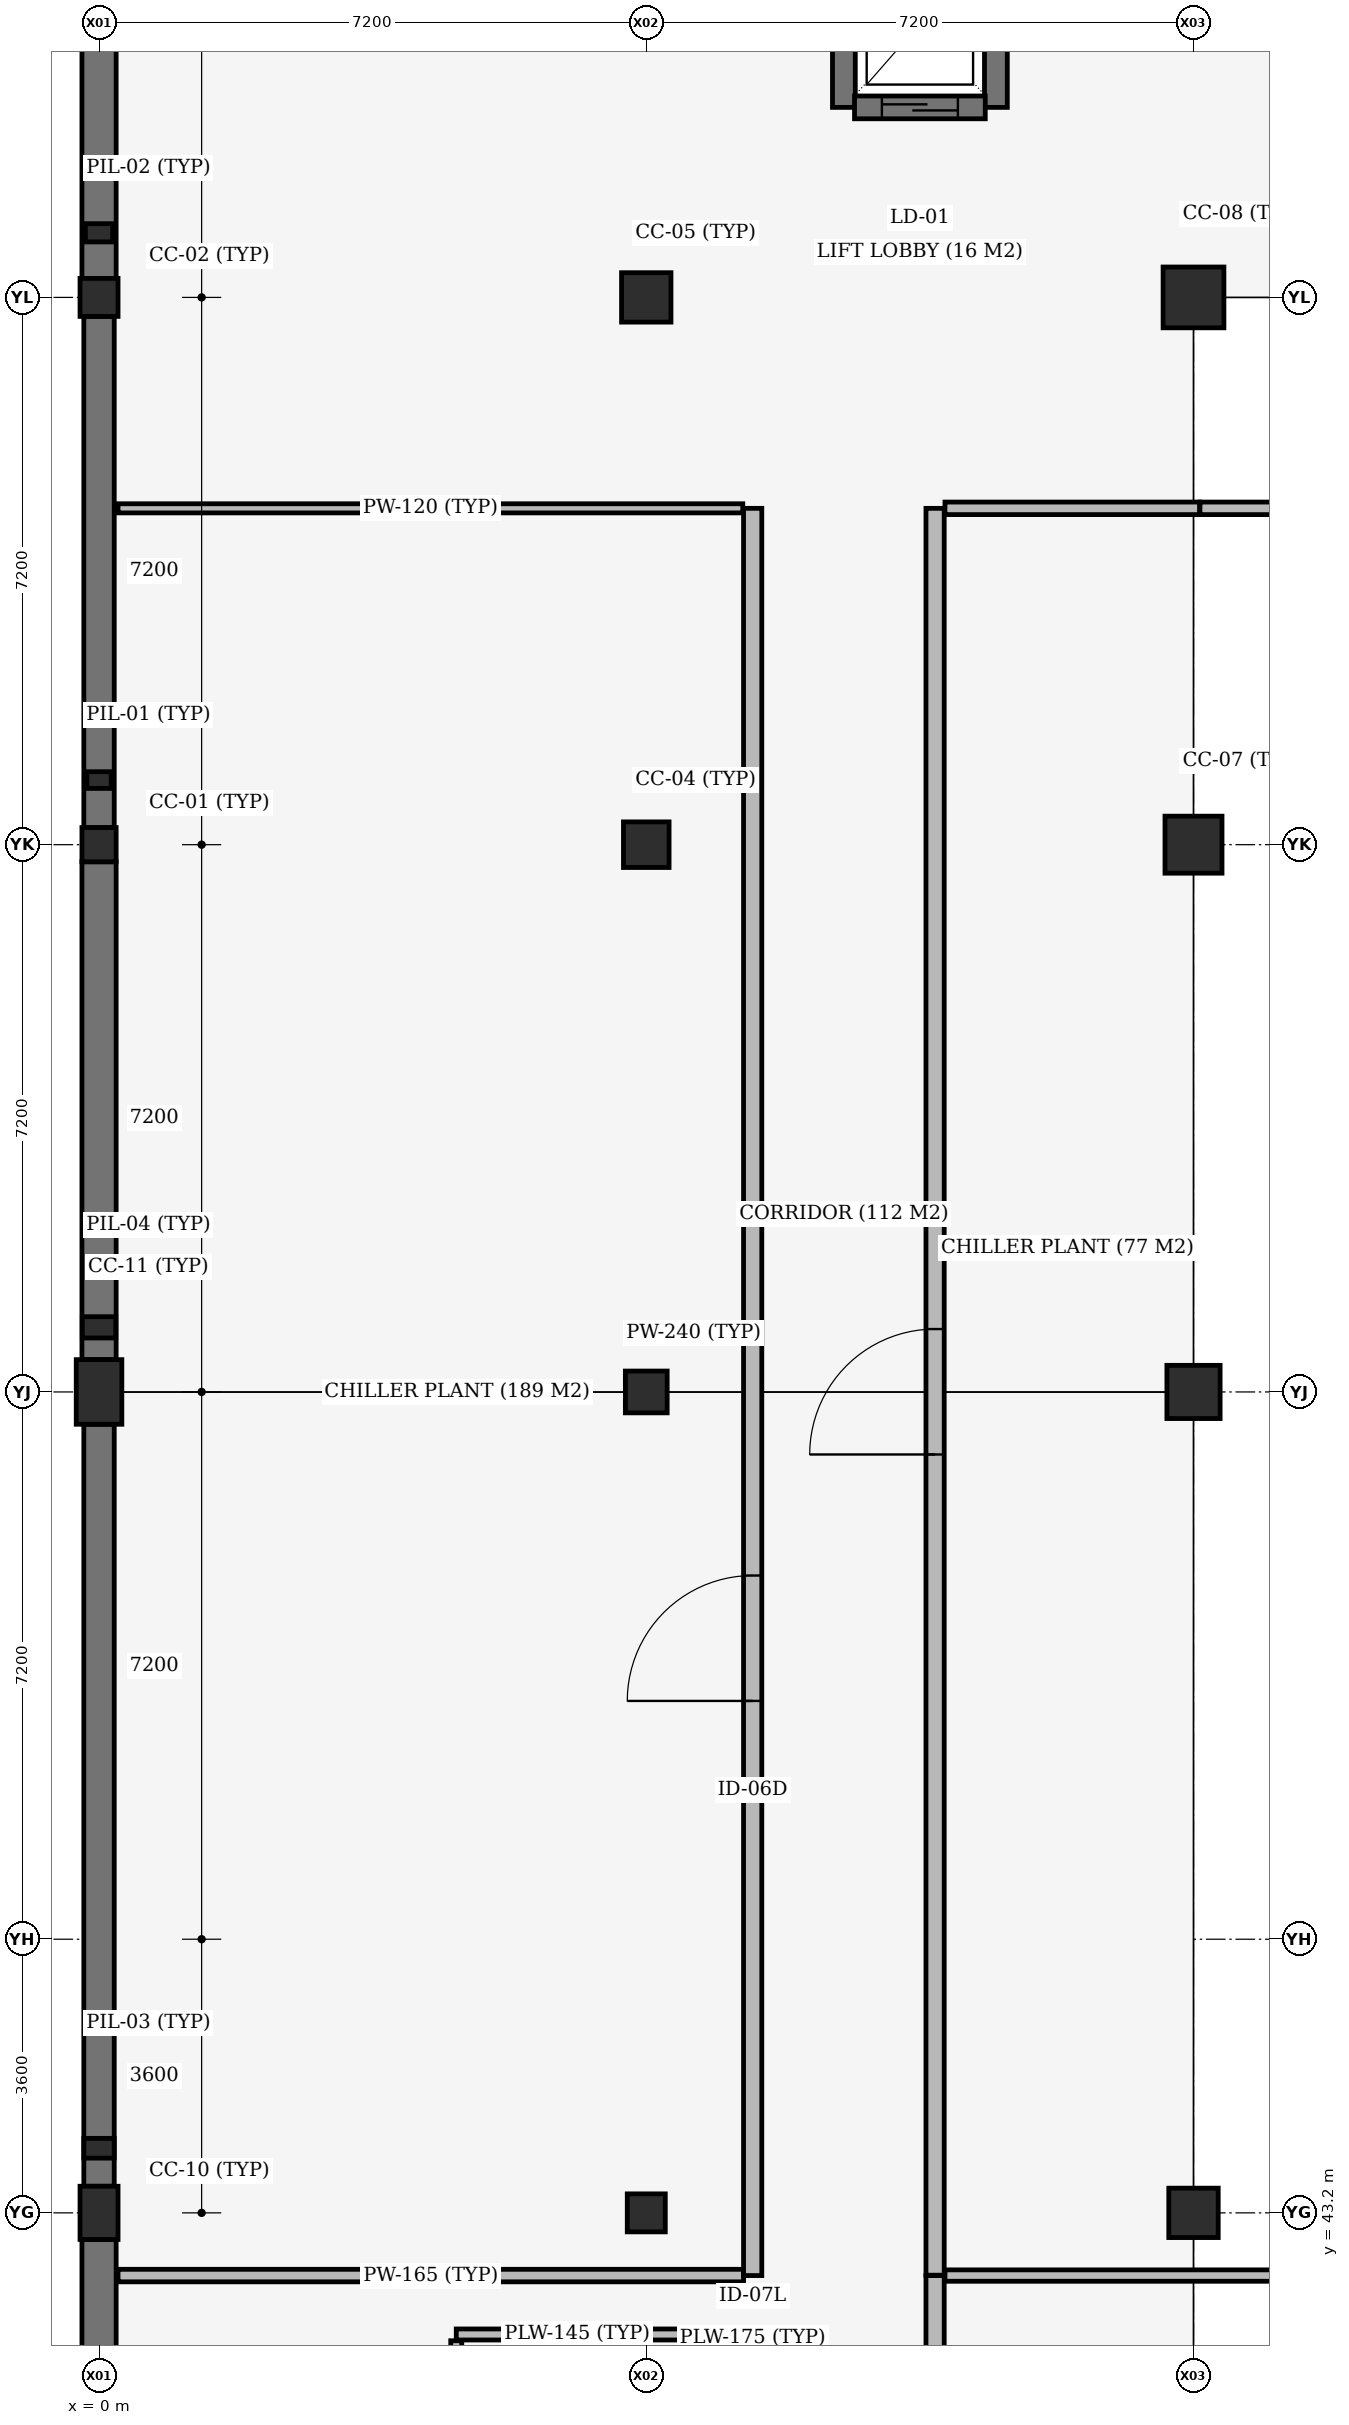
"""IFC4 building model, lengths in metres.
Left out: names, types, materials, properties, quantities, classifications, styles, units other than length and angle.
Written with IfcOpenShell. Run it as: python <this file> out.ifc"""

import sys

from ifc_helpers import new_model, si_unit, direction, frame, frame_2d, origin, origin_2d, place, context, subcontext, project, spatial, rectangle, extrude, element, fill, save


model = new_model("IFC4")
c1 = context("Model", 3, precision=1e-05, world=origin(), true_north=direction((0.0, 1.0)))
c2 = subcontext(c1, "Body", "Model", "MODEL_VIEW")
j1 = project(units=[si_unit("LENGTHUNIT", "METRE"), si_unit("PLANEANGLEUNIT", "RADIAN")], contexts=[c1])
p1 = place(None, origin())
s1 = spatial("IfcSite", under=j1, at=p1, CompositionType="ELEMENT")
p2 = place(p1, origin())
s2 = spatial("IfcBuilding", under=s1, at=p2, CompositionType="ELEMENT")
p3 = place(p2, frame((0.0, 0.0, -4.5)))
s3 = spatial("IfcBuildingStorey", under=s2, at=p3, CompositionType="ELEMENT", Elevation=-4.5)
p4 = place(p3, frame((0.0, 43.2, -0.42), z_axis=(0.0, 0.0, 1.0), x_axis=(1.0, 0.0, 0.0)))
e1 = element("IfcColumn", 1, at=p4, inside=s3, PredefinedType="COLUMN", context=c2, shape_type="SweptSolid", body=[
    extrude(rectangle(XDim=0.5, YDim=0.7, at=origin_2d()), origin(), (0.0, 0.0, 1.0), 4.6),
])
p5 = place(p3, frame((0.0, 54.0, -0.42), z_axis=(0.0, 0.0, 1.0), x_axis=(1.0, 0.0, 0.0)))
e2 = element("IfcColumn", 2, at=p5, inside=s3, PredefinedType="COLUMN", context=c2, shape_type="SweptSolid", body=[
    extrude(rectangle(XDim=0.6, YDim=0.85, at=origin_2d()), origin(), (0.0, 0.0, 1.0), 4.6),
])
p6 = place(p3, frame((0.0, 61.2, -0.42), z_axis=(0.0, 0.0, 1.0), x_axis=(1.0, 0.0, 0.0)))
e3 = element("IfcColumn", 3, at=p6, inside=s3, PredefinedType="COLUMN", context=c2, shape_type="SweptSolid", body=[
    extrude(rectangle(XDim=0.45, YDim=0.45, at=origin_2d()), origin(), (0.0, 0.0, 1.0), 4.6),
])
for number, where, z_axis, x_axis in (
    (4, (0.0, 68.4, -0.42), (0.0, 0.0, 1.0), (1.0, 0.0, 0.0)),
    (5, (7.2, 43.2, -0.42), (0.0, 0.0, 1.0), (1.0, 0.0, 0.0)),
):
    element("IfcColumn", number, at=place(p3, frame(where, z_axis=z_axis, x_axis=x_axis)), inside=s3, PredefinedType="COLUMN", context=c2, shape_type="SweptSolid", body=[
        extrude(rectangle(XDim=0.5, YDim=0.5, at=origin_2d()), origin(), (0.0, 0.0, 1.0), 4.6),
    ])
p7 = place(p3, frame((7.2, 54.0, -0.42), z_axis=(0.0, 0.0, 1.0), x_axis=(1.0, 0.0, 0.0)))
e6 = element("IfcColumn", 6, at=p7, inside=s3, PredefinedType="COLUMN", context=c2, shape_type="SweptSolid", body=[
    extrude(rectangle(XDim=0.55, YDim=0.55, at=origin_2d()), origin(), (0.0, 0.0, 1.0), 4.6),
])
p8 = place(p3, frame((7.2, 61.2, -0.42), z_axis=(0.0, 0.0, 1.0), x_axis=(1.0, 0.0, 0.0)))
e7 = element("IfcColumn", 7, at=p8, inside=s3, PredefinedType="COLUMN", context=c2, shape_type="SweptSolid", body=[
    extrude(rectangle(XDim=0.6, YDim=0.6, at=origin_2d()), origin(), (0.0, 0.0, 1.0), 4.6),
])
for number, where, z_axis, x_axis in (
    (8, (7.2, 68.4, -0.42), (0.0, 0.0, 1.0), (1.0, 0.0, 0.0)),
    (9, (14.4, 43.2, -0.42), (0.0, 0.0, 1.0), (1.0, 0.0, 0.0)),
):
    element("IfcColumn", number, at=place(p3, frame(where, z_axis=z_axis, x_axis=x_axis)), inside=s3, PredefinedType="COLUMN", context=c2, shape_type="SweptSolid", body=[
        extrude(rectangle(XDim=0.65, YDim=0.65, at=origin_2d()), origin(), (0.0, 0.0, 1.0), 4.6),
    ])
p9 = place(p3, frame((14.4, 54.0, -0.42), z_axis=(0.0, 0.0, 1.0), x_axis=(1.0, 0.0, 0.0)))
e10 = element("IfcColumn", 10, at=p9, inside=s3, PredefinedType="COLUMN", context=c2, shape_type="SweptSolid", body=[
    extrude(rectangle(XDim=0.7, YDim=0.7, at=origin_2d()), origin(), (0.0, 0.0, 1.0), 4.6),
])
p10 = place(p3, frame((14.4, 61.2, -0.42), z_axis=(0.0, 0.0, 1.0), x_axis=(1.0, 0.0, 0.0)))
e11 = element("IfcColumn", 11, at=p10, inside=s3, PredefinedType="COLUMN", context=c2, shape_type="SweptSolid", body=[
    extrude(rectangle(XDim=0.75, YDim=0.75, at=origin_2d()), origin(), (0.0, 0.0, 1.0), 4.6),
])
p11 = place(p3, frame((14.4, 68.4, -0.42), z_axis=(0.0, 0.0, 1.0), x_axis=(1.0, 0.0, 0.0)))
e12 = element("IfcColumn", 12, at=p11, inside=s3, PredefinedType="COLUMN", context=c2, shape_type="SweptSolid", body=[
    extrude(rectangle(XDim=0.8, YDim=0.8, at=origin_2d()), origin(), (0.0, 0.0, 1.0), 4.6),
])
p12 = place(p3, frame((0.0, 44.05, -0.42), z_axis=(0.0, 0.0, 1.0), x_axis=(1.0, 0.0, 0.0)))
e13 = element("IfcColumn", 13, at=p12, inside=s3, PredefinedType="PILASTER", context=c2, shape_type="SweptSolid", body=[
    extrude(rectangle(XDim=0.4, YDim=0.26, at=origin_2d()), origin(), (0.0, 0.0, 1.0), 4.6),
])
p13 = place(p3, frame((0.0, 54.85, -0.42), z_axis=(0.0, 0.0, 1.0), x_axis=(1.0, 0.0, 0.0)))
e14 = element("IfcColumn", 14, at=p13, inside=s3, PredefinedType="PILASTER", context=c2, shape_type="SweptSolid", body=[
    extrude(rectangle(XDim=0.44, YDim=0.28, at=origin_2d()), origin(), (0.0, 0.0, 1.0), 4.6),
])
p14 = place(p3, frame((0.0, 62.05, -0.42), z_axis=(0.0, 0.0, 1.0), x_axis=(1.0, 0.0, 0.0)))
e15 = element("IfcColumn", 15, at=p14, inside=s3, PredefinedType="PILASTER", context=c2, shape_type="SweptSolid", body=[
    extrude(rectangle(XDim=0.32, YDim=0.22, at=origin_2d()), origin(), (0.0, 0.0, 1.0), 4.6),
])
p15 = place(p3, frame((0.0, 69.25, -0.42), z_axis=(0.0, 0.0, 1.0), x_axis=(1.0, 0.0, 0.0)))
e16 = element("IfcColumn", 16, at=p15, inside=s3, PredefinedType="PILASTER", context=c2, shape_type="SweptSolid", body=[
    extrude(rectangle(XDim=0.36, YDim=0.24, at=origin_2d()), origin(), (0.0, 0.0, 1.0), 4.6),
])
for number, where, z_axis, x_axis in (
    (17, (9.8, 73.1, 0.0), (0.0, 0.0, 1.0), (0.0, -1.0, 0.0)),
    (18, (11.8, 70.9, 0.0), (0.0, 0.0, 1.0), (0.0, 1.0, 0.0)),
):
    element("IfcWall", number, at=place(p3, frame(where, z_axis=z_axis, x_axis=x_axis)), inside=s3, PredefinedType="SHEAR", context=c2, shape_type="SweptSolid", body=[
        extrude(rectangle(XDim=2.2, YDim=0.3, at=frame_2d((1.1, 0.0))), origin(), (0.0, 0.0, 1.0), 4.18),
    ])
p16 = place(p3, frame((0.0, 36.4, 0.0), z_axis=(0.0, 0.0, 1.0), x_axis=(0.0, 1.0, 0.0)))
e19 = element("IfcWall", 19, at=p16, inside=s3, PredefinedType="USERDEFINED", context=c2, shape_type="SweptSolid", body=[
    extrude(rectangle(XDim=6.45, YDim=0.45, at=frame_2d((3.225, 0.0))), origin(), (0.0, 0.0, 1.0), 4.18),
])
p17 = place(p3, frame((0.0, 43.55, 0.0), z_axis=(0.0, 0.0, 1.0), x_axis=(0.0, 1.0, 0.0)))
e20 = element("IfcWall", 20, at=p17, inside=s3, PredefinedType="USERDEFINED", context=c2, shape_type="SweptSolid", body=[
    extrude(rectangle(XDim=10.025, YDim=0.4, at=frame_2d((5.012, 0.0))), origin(), (0.0, 0.0, 1.0), 4.18),
])
p18 = place(p3, frame((0.0, 54.425, 0.0), z_axis=(0.0, 0.0, 1.0), x_axis=(0.0, 1.0, 0.0)))
e21 = element("IfcWall", 21, at=p18, inside=s3, PredefinedType="USERDEFINED", context=c2, shape_type="SweptSolid", body=[
    extrude(rectangle(XDim=6.55, YDim=0.45, at=frame_2d((3.275, 0.0))), origin(), (0.0, 0.0, 1.0), 4.18),
])
p19 = place(p3, frame((0.0, 61.425, 0.0), z_axis=(0.0, 0.0, 1.0), x_axis=(0.0, 1.0, 0.0)))
e22 = element("IfcWall", 22, at=p19, inside=s3, PredefinedType="USERDEFINED", context=c2, shape_type="SweptSolid", body=[
    extrude(rectangle(XDim=6.725, YDim=0.4, at=frame_2d((3.362, 0.0))), origin(), (0.0, 0.0, 1.0), 4.18),
])
p20 = place(p3, frame((0.0, 68.65, 0.0), z_axis=(0.0, 0.0, 1.0), x_axis=(0.0, 1.0, 0.0)))
e23 = element("IfcWall", 23, at=p20, inside=s3, PredefinedType="USERDEFINED", context=c2, shape_type="SweptSolid", body=[
    extrude(rectangle(XDim=6.675, YDim=0.45, at=frame_2d((3.337, 0.0))), origin(), (0.0, 0.0, 1.0), 4.18),
])
p21 = place(p3, frame((11.66, 70.9, 0.0), z_axis=(0.0, 0.0, 1.0), x_axis=(-1.0, 0.0, 0.0)))
e24 = element("IfcWall", 24, at=p21, inside=s3, PredefinedType="SHEAR", context=c2, shape_type="SweptSolid", body=[
    extrude(rectangle(XDim=1.72, YDim=0.3, at=frame_2d((0.86, 0.0))), origin(), (0.0, 0.0, 1.0), 4.18),
])
p22 = place(p21, frame((0.36, 0.0, 0.0)))
e25 = element("IfcOpeningElement", 25, at=p22, cuts=e24, PredefinedType="OPENING", context=c2, shape_type="SweptSolid", body=[
    extrude(rectangle(XDim=1.0, YDim=2.1, at=frame_2d((0.5, 1.05))), frame((0.0, 0.16, 0.0), z_axis=(0.0, -1.0, 0.0), x_axis=(1.0, 0.0, 0.0)), (0.0, 0.0, 1.0), 0.32),
])
p23 = place(p3, frame((8.6, 38.605, 0.0), z_axis=(0.0, 0.0, 1.0), x_axis=(0.0, 1.0, 0.0)))
e26 = element("IfcWall", 26, at=p23, inside=s3, PredefinedType="PLUMBINGWALL", context=c2, shape_type="SweptSolid", body=[
    extrude(rectangle(XDim=2.995, YDim=0.175, at=frame_2d((1.498, 0.0))), origin(), (0.0, 0.0, 1.0), 4.18),
])
p24 = place(p23, frame((1.038, 0.0, 0.0)))
e27 = element("IfcOpeningElement", 27, at=p24, cuts=e26, PredefinedType="OPENING", context=c2, shape_type="SweptSolid", body=[
    extrude(rectangle(XDim=0.92, YDim=2.1, at=frame_2d((0.46, 1.05))), frame((0.0, 0.097, 0.0), z_axis=(0.0, -1.0, 0.0), x_axis=(1.0, 0.0, 0.0)), (0.0, 0.0, 1.0), 0.195),
])
p25 = place(p3, frame((4.7, 41.6, 0.0), z_axis=(0.0, 0.0, 1.0), x_axis=(1.0, 0.0, 0.0)))
e28 = element("IfcWall", 28, at=p25, inside=s3, PredefinedType="PLUMBINGWALL", context=c2, shape_type="SweptSolid", body=[
    extrude(rectangle(XDim=3.78, YDim=0.145, at=frame_2d((1.89, 0.0))), origin(), (0.0, 0.0, 1.0), 3.38),
])
p26 = place(p3, frame((4.7, 38.683, 0.0), z_axis=(0.0, 0.0, 1.0), x_axis=(0.0, 1.0, 0.0)))
e29 = element("IfcWall", 29, at=p26, inside=s3, PredefinedType="PLUMBINGWALL", context=c2, shape_type="SweptSolid", body=[
    extrude(rectangle(XDim=2.835, YDim=0.145, at=frame_2d((1.417, 0.0))), origin(), (0.0, 0.0, 1.0), 3.94),
])
p27 = place(p3, frame((0.25, 42.375, 0.0), z_axis=(0.0, 0.0, 1.0), x_axis=(1.0, 0.0, 0.0)))
e30 = element("IfcWall", 30, at=p27, inside=s3, PredefinedType="PARTITIONING", context=c2, shape_type="SweptSolid", body=[
    extrude(rectangle(XDim=8.23, YDim=0.165, at=frame_2d((4.115, 0.0))), origin(), (0.0, 0.0, 1.0), 3.38),
])
p28 = place(p3, frame((8.6, 42.375, 0.0), z_axis=(0.0, 0.0, 1.0), x_axis=(0.0, 1.0, 0.0)))
e31 = element("IfcWall", 31, at=p28, inside=s3, PredefinedType="STANDARD", context=c2, shape_type="SweptSolid", body=[
    extrude(rectangle(XDim=23.25, YDim=0.24, at=frame_2d((11.625, 0.0))), origin(), (0.0, 0.0, 1.0), 3.43),
])
p29 = place(p28, frame((7.56, 0.0, 0.0)))
e32 = element("IfcOpeningElement", 32, at=p29, cuts=e31, PredefinedType="OPENING", context=c2, shape_type="SweptSolid", body=[
    extrude(rectangle(XDim=1.65, YDim=2.25, at=frame_2d((0.825, 1.125))), frame((0.0, 0.13, 0.0), z_axis=(0.0, -1.0, 0.0), x_axis=(1.0, 0.0, 0.0)), (0.0, 0.0, 1.0), 0.26),
])
p30 = place(p3, frame((0.25, 65.625, 0.0), z_axis=(0.0, 0.0, 1.0), x_axis=(1.0, 0.0, 0.0)))
e33 = element("IfcWall", 33, at=p30, inside=s3, PredefinedType="PARTITIONING", context=c2, shape_type="SweptSolid", body=[
    extrude(rectangle(XDim=8.22, YDim=0.12, at=frame_2d((4.11, 0.0))), origin(), (0.0, 0.0, 1.0), 3.48),
])
p31 = place(p3, frame((11.0, 23.0, 0.0), z_axis=(0.0, 0.0, 1.0), x_axis=(0.0, 1.0, 0.0)))
e34 = element("IfcWall", 34, at=p31, inside=s3, PredefinedType="STANDARD", context=c2, shape_type="SweptSolid", body=[
    extrude(rectangle(XDim=19.375, YDim=0.24, at=frame_2d((9.688, 0.0))), origin(), (0.0, 0.0, 1.0), 3.48),
])
p32 = place(p31, frame((8.863, 0.0, 0.0)))
e35 = element("IfcOpeningElement", 35, at=p32, cuts=e34, PredefinedType="OPENING", context=c2, shape_type="SweptSolid", body=[
    extrude(rectangle(XDim=1.65, YDim=2.25, at=frame_2d((0.825, 1.125))), frame((0.0, 0.13, 0.0), z_axis=(0.0, -1.0, 0.0), x_axis=(1.0, 0.0, 0.0)), (0.0, 0.0, 1.0), 0.26),
])
p33 = place(p3, frame((11.13, 42.375, 0.0), z_axis=(0.0, 0.0, 1.0), x_axis=(1.0, 0.0, 0.0)))
e36 = element("IfcWall", 36, at=p33, inside=s3, PredefinedType="PARTITIONING", context=c2, shape_type="SweptSolid", body=[
    extrude(rectangle(XDim=18.95, YDim=0.15, at=frame_2d((9.475, 0.0))), origin(), (0.0, 0.0, 1.0), 3.53),
])
p34 = place(p3, frame((11.0, 42.38, 0.0), z_axis=(0.0, 0.0, 1.0), x_axis=(0.0, 1.0, 0.0)))
e37 = element("IfcWall", 37, at=p34, inside=s3, PredefinedType="STANDARD", context=c2, shape_type="SweptSolid", body=[
    extrude(rectangle(XDim=23.245, YDim=0.24, at=frame_2d((11.623, 0.0))), origin(), (0.0, 0.0, 1.0), 3.43),
])
p35 = place(p34, frame((10.798, 0.0, 0.0)))
e38 = element("IfcOpeningElement", 38, at=p35, cuts=e37, PredefinedType="OPENING", context=c2, shape_type="SweptSolid", body=[
    extrude(rectangle(XDim=1.65, YDim=2.25, at=frame_2d((0.825, 1.125))), frame((0.0, 0.13, 0.0), z_axis=(0.0, -1.0, 0.0), x_axis=(1.0, 0.0, 0.0)), (0.0, 0.0, 1.0), 0.26),
])
p36 = place(p3, frame((11.13, 65.625, 0.0), z_axis=(0.0, 0.0, 1.0), x_axis=(1.0, 0.0, 0.0)))
e39 = element("IfcWall", 39, at=p36, inside=s3, PredefinedType="PARTITIONING", context=c2, shape_type="SweptSolid", body=[
    extrude(rectangle(XDim=3.35, YDim=0.165, at=frame_2d((1.675, 0.0))), origin(), (0.0, 0.0, 1.0), 3.38),
])
p37 = place(p3, frame((14.485, 65.625, 0.0), z_axis=(0.0, 0.0, 1.0), x_axis=(1.0, 0.0, 0.0)))
e40 = element("IfcWall", 40, at=p37, inside=s3, PredefinedType="PARTITIONING", context=c2, shape_type="SweptSolid", body=[
    extrude(rectangle(XDim=15.595, YDim=0.165, at=frame_2d((7.797, 0.0))), origin(), (0.0, 0.0, 1.0), 3.38),
])
p38 = place(p22, origin())
e41 = element("IfcDoor", 41, at=p38, inside=s3, OperationType="SLIDING_TO_LEFT", PredefinedType="DOOR", context=c2, shape_type="SweptSolid", body=[
    extrude(rectangle(XDim=1.0, YDim=2.1, at=frame_2d((0.5, 1.05))), frame((0.0, 0.025, 0.0), z_axis=(0.0, -1.0, 0.0), x_axis=(1.0, 0.0, 0.0)), (0.0, 0.0, 1.0), 0.05),
])
fill(e25, e41)
p39 = place(p29, origin())
e42 = element("IfcDoor", 42, at=p39, inside=s3, OperationType="DOUBLE_DOOR_SINGLE_SWING", PredefinedType="DOOR", context=c2, shape_type="SweptSolid", body=[
    extrude(rectangle(XDim=1.65, YDim=2.25, at=frame_2d((0.825, 1.125))), frame((0.0, 0.025, 0.0), z_axis=(0.0, -1.0, 0.0), x_axis=(1.0, 0.0, 0.0)), (0.0, 0.0, 1.0), 0.05),
])
fill(e32, e42)
p40 = place(p35, origin())
e43 = element("IfcDoor", 43, at=p40, inside=s3, OperationType="DOUBLE_DOOR_SINGLE_SWING", PredefinedType="DOOR", context=c2, shape_type="SweptSolid", body=[
    extrude(rectangle(XDim=1.65, YDim=2.25, at=frame_2d((0.825, 1.125))), frame((0.0, 0.025, 0.0), z_axis=(0.0, -1.0, 0.0), x_axis=(1.0, 0.0, 0.0)), (0.0, 0.0, 1.0), 0.05),
])
fill(e38, e43)
save(model, sys.argv[1])
